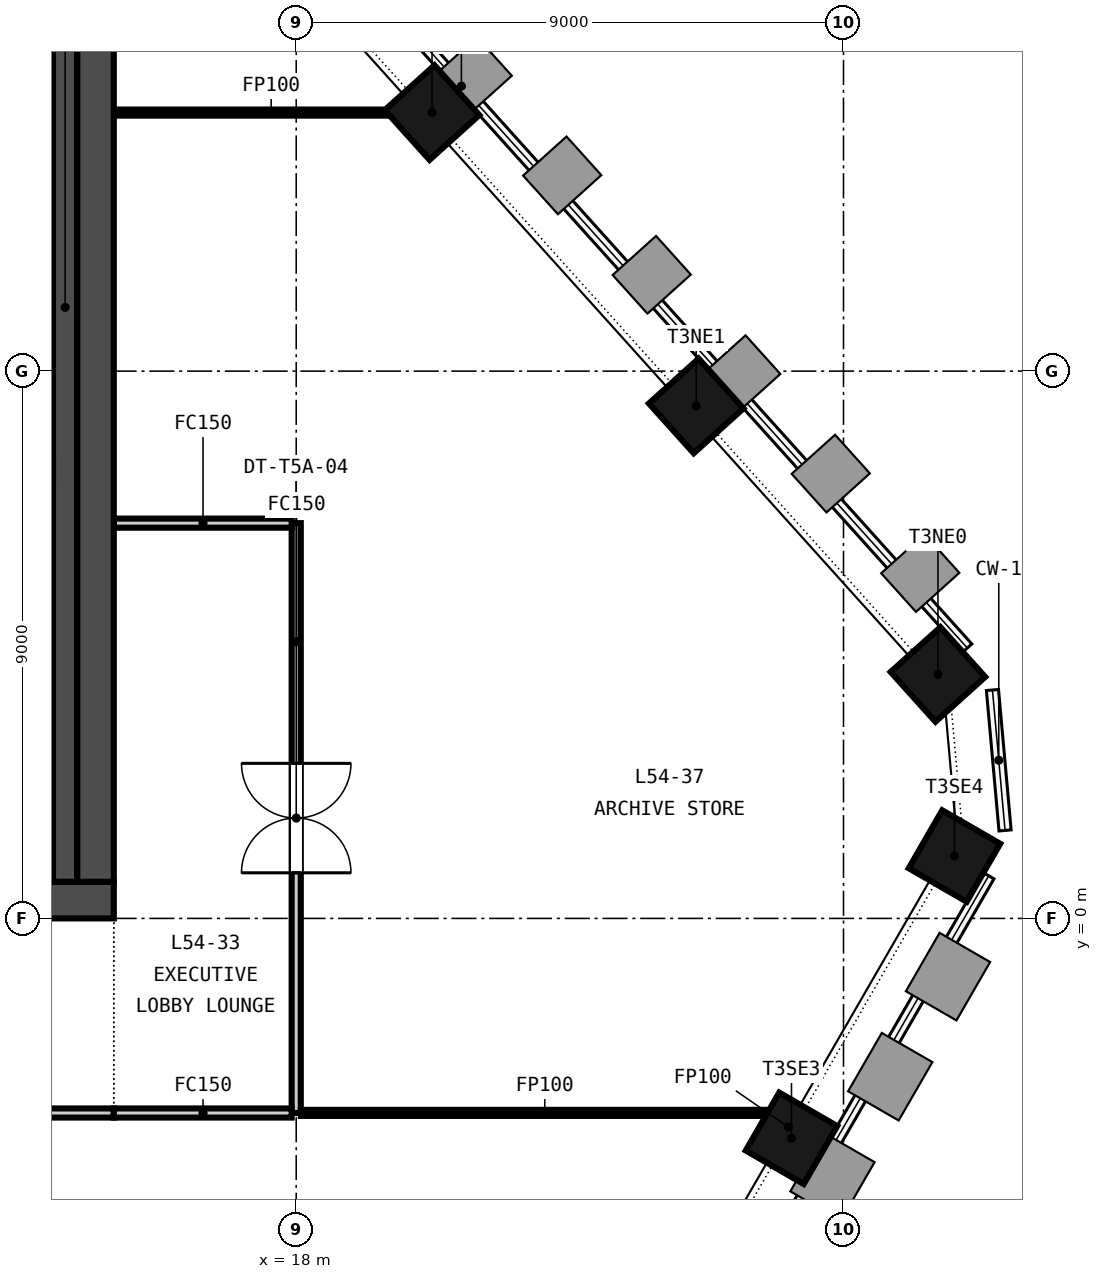
"""IFC4 building model, lengths in metres.
Left out: names, types, materials, properties, quantities, classifications, styles, units other than length and angle.
Written with IfcOpenShell. Run it as: python <this file> out.ifc"""

import sys

from ifc_helpers import new_model, si_unit, direction, frame, frame_2d, origin, origin_2d, place, context, subcontext, project, spatial, rectangle, extrude, element, fill, save


model = new_model("IFC4")
c1 = context("Model", 3, precision=1e-05, world=origin(), true_north=direction((0.0, 1.0)))
c2 = subcontext(c1, "Body", "Model", "MODEL_VIEW")
j1 = project(units=[si_unit("LENGTHUNIT", "METRE"), si_unit("PLANEANGLEUNIT", "RADIAN")], contexts=[c1])
p1 = place(None, origin())
s1 = spatial("IfcSite", under=j1, at=p1, CompositionType="ELEMENT")
p2 = place(p1, origin())
s2 = spatial("IfcBuilding", under=s1, at=p2, CompositionType="ELEMENT")
p3 = place(p2, frame((0.0, 0.0, 216.3)))
s3 = spatial("IfcBuildingStorey", under=s2, at=p3, CompositionType="ELEMENT", Elevation=216.3)
p4 = place(p3, frame((-15.0, 0.3, -0.15), z_axis=(0.0, 0.0, 1.0), x_axis=(1.0, 0.0, 0.0)))
e1 = element("IfcWall", 1, at=p4, inside=s3, PredefinedType="SOLIDWALL", context=c2, shape_type="SweptSolid", body=[
    extrude(rectangle(XDim=30.0, YDim=0.6, at=frame_2d((15.0, 0.0))), origin(), (0.0, 0.0, 1.0), 3.65),
])
p5 = place(p4, frame((5.8, 0.0, 0.15)))
e2 = element("IfcOpeningElement", 2, at=p5, cuts=e1, PredefinedType="OPENING", context=c2, shape_type="SweptSolid", body=[
    extrude(rectangle(XDim=2.4, YDim=2.4, at=frame_2d((1.2, 1.2))), frame((0.0, 0.31, 0.0), z_axis=(0.0, -1.0, 0.0), x_axis=(1.0, 0.0, 0.0)), (0.0, 0.0, 1.0), 0.62),
])
p6 = place(p4, frame((13.8, 0.0, 0.15)))
e3 = element("IfcOpeningElement", 3, at=p6, cuts=e1, PredefinedType="OPENING", context=c2, shape_type="SweptSolid", body=[
    extrude(rectangle(XDim=2.4, YDim=2.4, at=frame_2d((1.2, 1.2))), frame((0.0, 0.31, 0.0), z_axis=(0.0, -1.0, 0.0), x_axis=(1.0, 0.0, 0.0)), (0.0, 0.0, 1.0), 0.62),
])
p7 = place(p4, frame((21.8, 0.0, 0.15)))
e4 = element("IfcOpeningElement", 4, at=p7, cuts=e1, PredefinedType="OPENING", context=c2, shape_type="SweptSolid", body=[
    extrude(rectangle(XDim=2.4, YDim=2.4, at=frame_2d((1.2, 1.2))), frame((0.0, 0.31, 0.0), z_axis=(0.0, -1.0, 0.0), x_axis=(1.0, 0.0, 0.0)), (0.0, 0.0, 1.0), 0.62),
])
p8 = place(p4, frame((1.5, 0.0, 0.15)))
e5 = element("IfcOpeningElement", 5, at=p8, cuts=e1, PredefinedType="OPENING", context=c2, shape_type="SweptSolid", body=[
    extrude(rectangle(XDim=1.2, YDim=2.1, at=frame_2d((0.6, 1.05))), frame((0.0, 0.31, 0.0), z_axis=(0.0, -1.0, 0.0), x_axis=(1.0, 0.0, 0.0)), (0.0, 0.0, 1.0), 0.62),
])
p9 = place(p4, frame((27.3, 0.0, 0.15)))
e6 = element("IfcOpeningElement", 6, at=p9, cuts=e1, PredefinedType="OPENING", context=c2, shape_type="SweptSolid", body=[
    extrude(rectangle(XDim=1.2, YDim=2.1, at=frame_2d((0.6, 1.05))), frame((0.0, 0.31, 0.0), z_axis=(0.0, -1.0, 0.0), x_axis=(1.0, 0.0, 0.0)), (0.0, 0.0, 1.0), 0.62),
])
p10 = place(p3, frame((14.7, 0.6, -0.15), z_axis=(0.0, 0.0, 1.0), x_axis=(0.0, 1.0, 0.0)))
e7 = element("IfcWall", 7, at=p10, inside=s3, PredefinedType="SOLIDWALL", context=c2, shape_type="SweptSolid", body=[
    extrude(rectangle(XDim=13.8, YDim=0.6, at=frame_2d((6.9, 0.0))), origin(), (0.0, 0.0, 1.0), 3.65),
])
for number, where, z_axis, x_axis in (
    (8, (26.145, -3.616, -0.15), (0.0, 0.0, 1.0), (0.5, 0.866, 0.0)),
    (9, (28.825, 1.026, -0.15), (0.0, 0.0, 1.0), (0.5, 0.866, 0.0)),
    (10, (28.553, 4.012, -0.15), (0.0, 0.0, 1.0), (-0.669, 0.743, 0.0)),
    (11, (24.577, 8.427, -0.15), (0.0, 0.0, 1.0), (-0.669, 0.743, 0.0)),
    (12, (20.233, 13.252, -0.15), (0.0, 0.0, 1.0), (-0.669, 0.743, 0.0)),
):
    element("IfcColumn", number, at=place(p3, frame(where, z_axis=z_axis, x_axis=x_axis)), inside=s3, PredefinedType="COLUMN", context=c2, shape_type="SweptSolid", body=[
        extrude(rectangle(XDim=1.1, YDim=1.1, at=origin_2d()), origin(), (0.0, 0.0, 1.0), 3.65),
    ])
p11 = place(p3, frame((11.05, 7.35, 0.0), z_axis=(0.0, 0.0, 1.0), x_axis=(1.0, 0.0, 0.0)))
e13 = element("IfcWall", 13, at=p11, inside=s3, PredefinedType="SOLIDWALL", context=c2, shape_type="SweptSolid", body=[
    extrude(rectangle(XDim=2.95, YDim=0.3, at=frame_2d((1.475, 0.0))), origin(), (0.0, 0.0, 1.0), 3.5),
])
p12 = place(p3, frame((14.2, 0.6, 0.0), z_axis=(0.0, 0.0, 1.0), x_axis=(0.0, 1.0, 0.0)))
e14 = element("IfcWall", 14, at=p12, inside=s3, PredefinedType="SOLIDWALL", context=c2, shape_type="SweptSolid", body=[
    extrude(rectangle(XDim=13.8, YDim=0.4, at=frame_2d((6.9, 0.0))), origin(), (0.0, 0.0, 1.0), 3.5),
])
p13 = place(p3, frame((15.0, -3.2, 0.0), z_axis=(0.0, 0.0, 1.0), x_axis=(-1.0, 0.0, 0.0)))
e15 = element("IfcWall", 15, at=p13, inside=s3, PredefinedType="PARTITIONING", context=c2, shape_type="SweptSolid", body=[
    extrude(rectangle(XDim=30.0, YDim=0.15, at=frame_2d((15.0, 0.0))), origin(), (0.0, 0.0, 1.0), 2.751),
])
p14 = place(p13, frame((14.1, 0.0, 0.0)))
e16 = element("IfcOpeningElement", 16, at=p14, cuts=e15, PredefinedType="OPENING", context=c2, shape_type="SweptSolid", body=[
    extrude(rectangle(XDim=1.8, YDim=2.1, at=frame_2d((0.9, 1.05))), frame((0.0, 0.085, 0.0), z_axis=(0.0, -1.0, 0.0), x_axis=(1.0, 0.0, 0.0)), (0.0, 0.0, 1.0), 0.17),
])
p15 = place(p3, frame((18.0, 6.5, 0.0), z_axis=(0.0, 0.0, 1.0), x_axis=(0.0, -1.0, 0.0)))
e17 = element("IfcWall", 17, at=p15, inside=s3, PredefinedType="PARTITIONING", context=c2, shape_type="SweptSolid", body=[
    extrude(rectangle(XDim=9.7, YDim=0.15, at=frame_2d((4.85, 0.0))), origin(), (0.0, 0.0, 1.0), 2.751),
])
p16 = place(p15, frame((3.95, 0.0, 0.0)))
e18 = element("IfcOpeningElement", 18, at=p16, cuts=e17, PredefinedType="OPENING", context=c2, shape_type="SweptSolid", body=[
    extrude(rectangle(XDim=1.8, YDim=2.1, at=frame_2d((0.9, 1.05))), frame((0.0, 0.085, 0.0), z_axis=(0.0, -1.0, 0.0), x_axis=(1.0, 0.0, 0.0)), (0.0, 0.0, 1.0), 0.17),
])
p17 = place(p3, frame((17.925, -3.2, 0.0), z_axis=(0.0, 0.0, 1.0), x_axis=(-1.0, 0.0, 0.0)))
e19 = element("IfcWall", 19, at=p17, inside=s3, PredefinedType="PARTITIONING", context=c2, shape_type="SweptSolid", body=[
    extrude(rectangle(XDim=2.925, YDim=0.15, at=frame_2d((1.462, 0.0))), origin(), (0.0, 0.0, 1.0), 2.751),
])
p18 = place(p3, frame((15.0, 13.252, 0.0), z_axis=(0.0, 0.0, 1.0), x_axis=(1.0, 0.0, 0.0)))
e20 = element("IfcWall", 20, at=p18, inside=s3, PredefinedType="PARTITIONING", context=c2, shape_type="SweptSolid", body=[
    extrude(rectangle(XDim=5.166, YDim=0.1, at=frame_2d((2.583, 0.0))), origin(), (0.0, 0.0, 1.0), 2.751),
])
p19 = place(p3, frame((15.0, 6.5, 0.0), z_axis=(0.0, 0.0, 1.0), x_axis=(1.0, 0.0, 0.0)))
e21 = element("IfcWall", 21, at=p19, inside=s3, PredefinedType="PARTITIONING", context=c2, shape_type="SweptSolid", body=[
    extrude(rectangle(XDim=2.925, YDim=0.15, at=frame_2d((1.462, 0.0))), origin(), (0.0, 0.0, 1.0), 2.751),
])
p20 = place(p3, frame((18.076, -3.198, 0.0), z_axis=(0.0, 0.0, 1.0), x_axis=(1.0, 0.0, 0.0)))
e22 = element("IfcWall", 22, at=p20, inside=s3, PredefinedType="PARTITIONING", context=c2, shape_type="SweptSolid", body=[
    extrude(rectangle(XDim=8.013, YDim=0.1, at=frame_2d((4.007, 0.0))), origin(), (0.0, 0.0, 1.0), 2.751),
])
p21 = place(p3, frame((26.089, -3.613, 0.0), z_axis=(0.0, 0.0, 1.0), x_axis=(0.0, 1.0, 0.0)))
e23 = element("IfcWall", 23, at=p21, inside=s3, PredefinedType="PARTITIONING", context=c2, shape_type="SweptSolid", body=[
    extrude(rectangle(XDim=0.365, YDim=0.1, at=frame_2d((0.183, 0.0))), origin(), (0.0, 0.0, 1.0), 2.751),
])
p22 = place(p16, origin())
e24 = element("IfcDoor", 24, at=p22, inside=s3, OperationType="DOUBLE_DOOR_DOUBLE_SWING", PredefinedType="DOOR", context=c2, shape_type="SweptSolid", body=[
    extrude(rectangle(XDim=1.8, YDim=2.1, at=frame_2d((0.9, 1.05))), frame((0.0, 0.025, 0.0), z_axis=(0.0, -1.0, 0.0), x_axis=(1.0, 0.0, 0.0)), (0.0, 0.0, 1.0), 0.05),
])
fill(e18, e24)
save(model, sys.argv[1])
